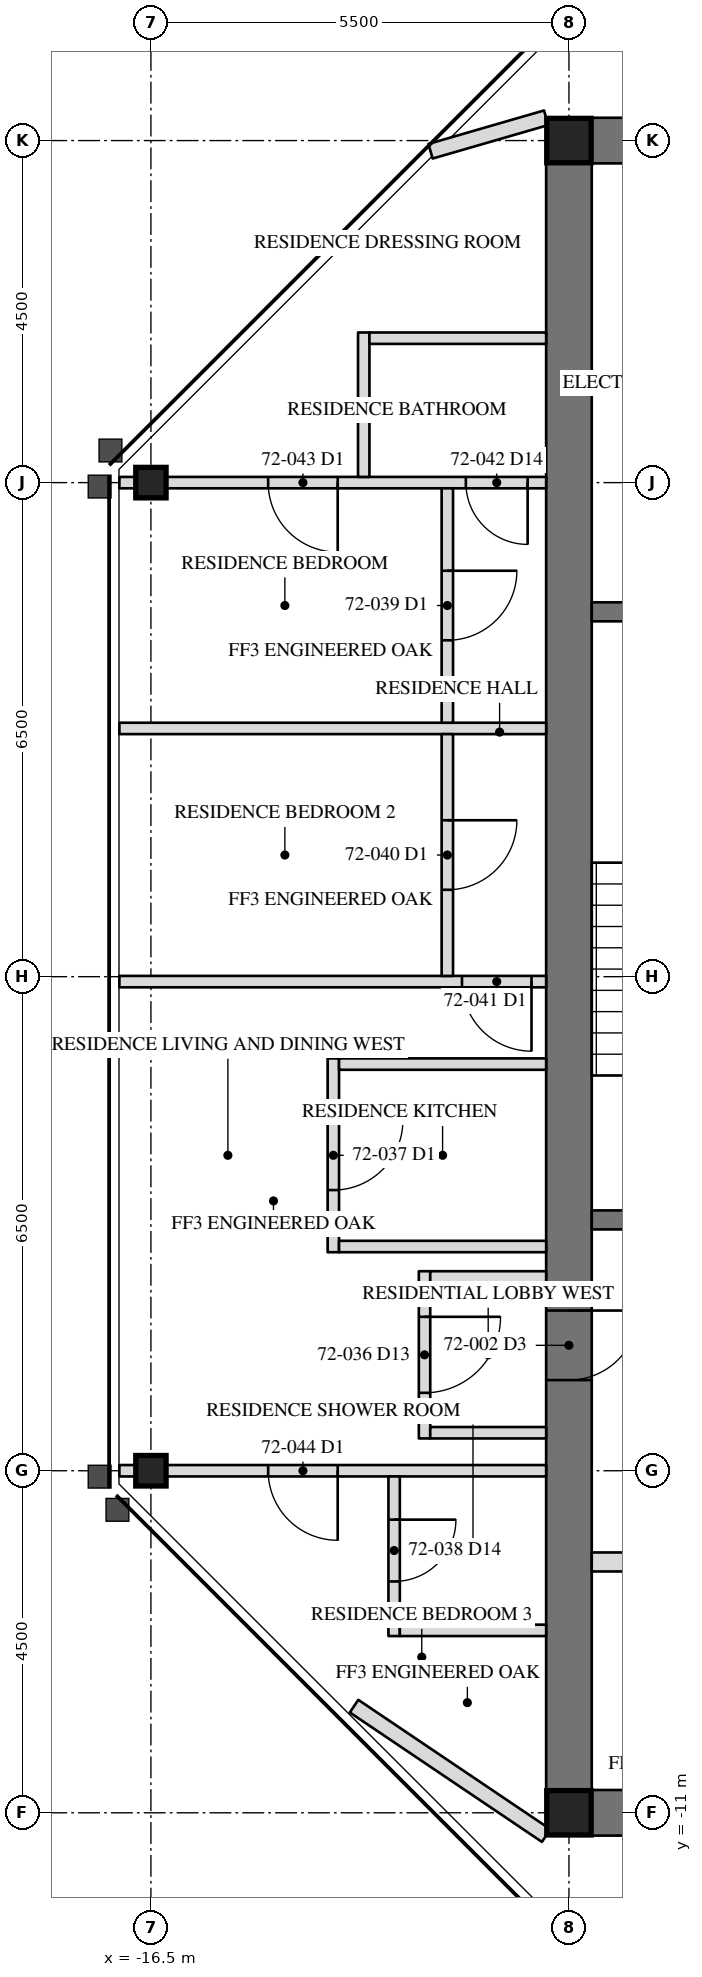
"""IFC4 building model, lengths in metres.
Left out: names, types, materials, properties, quantities, classifications, styles, units other than length and angle.
Written with IfcOpenShell. Run it as: python <this file> out.ifc"""

import sys

from ifc_helpers import new_model, si_unit, direction, frame, frame_2d, origin, origin_2d, place, context, subcontext, project, spatial, rectangle, hollow_rectangle, i_section, extrude, element, fill, save


model = new_model("IFC4")
c1 = context("Model", 3, precision=1e-05, world=origin(), true_north=direction((0.0, 1.0)))
c2 = subcontext(c1, "Body", "Model", "MODEL_VIEW")
j1 = project(units=[si_unit("LENGTHUNIT", "METRE"), si_unit("PLANEANGLEUNIT", "RADIAN")], contexts=[c1])
p1 = place(None, origin())
s1 = spatial("IfcSite", under=j1, at=p1, CompositionType="ELEMENT")
p2 = place(p1, origin())
s2 = spatial("IfcBuilding", under=s1, at=p2, CompositionType="ELEMENT")
p3 = place(p2, frame((0.0, 0.0, 292.0)))
s3 = spatial("IfcBuildingStorey", under=s2, at=p3, CompositionType="ELEMENT", Elevation=292.0)
for number, where, z_axis, x_axis in (
    (1, (-16.5, -6.5, 0.0), (0.0, 0.0, 1.0), (0.0, 1.0, 0.0)),
    (2, (-16.5, 6.5, 0.0), (0.0, 0.0, 1.0), (0.0, 1.0, 0.0)),
):
    element("IfcColumn", number, at=place(p3, frame(where, z_axis=z_axis, x_axis=x_axis)), inside=s3, PredefinedType="COLUMN", context=c2, shape_type="SweptSolid", body=[
        extrude(i_section(OverallWidth=0.401, OverallDepth=0.399, WebThickness=0.025, FlangeThickness=0.04, at=origin_2d()), origin(), (0.0, 0.0, 1.0), 3.6),
    ])
p4 = place(p3, frame((-11.0, 11.0, 0.0), z_axis=(0.0, 0.0, 1.0), x_axis=(0.0, -1.0, 0.0)))
e3 = element("IfcWall", 3, at=p4, inside=s3, PredefinedType="SHEAR", context=c2, shape_type="SweptSolid", body=[
    extrude(rectangle(XDim=22.0, YDim=0.6, at=frame_2d((11.0, 0.0))), origin(), (0.0, 0.0, 1.0), 3.6),
])
p5 = place(p4, frame((15.393, 0.0, 0.0)))
e4 = element("IfcOpeningElement", 4, at=p5, cuts=e3, PredefinedType="OPENING", context=c2, shape_type="SweptSolid", body=[
    extrude(rectangle(XDim=0.915, YDim=2.134, at=frame_2d((0.458, 1.067))), frame((0.0, 0.31, 0.0), z_axis=(0.0, -1.0, 0.0), x_axis=(1.0, 0.0, 0.0)), (0.0, 0.0, 1.0), 0.62),
])
for number, where, z_axis, x_axis in (
    (5, (-6.5, 11.0, 0.0), (0.0, 0.0, 1.0), (-1.0, 0.0, 0.0)),
    (6, (-11.0, -11.0, 0.0), (0.0, 0.0, 1.0), (1.0, 0.0, 0.0)),
):
    element("IfcWall", number, at=place(p3, frame(where, z_axis=z_axis, x_axis=x_axis)), inside=s3, PredefinedType="SHEAR", context=c2, shape_type="SweptSolid", body=[
        extrude(rectangle(XDim=4.5, YDim=0.6, at=frame_2d((2.25, 0.0))), origin(), (0.0, 0.0, 1.0), 3.6),
    ])
for number, where, z_axis, x_axis in (
    (7, (-11.0, 11.0, 0.0), (0.0, 0.0, 1.0), (1.0, 0.0, 0.0)),
    (8, (-11.0, -11.0, 0.0), (0.0, 0.0, 1.0), (1.0, 0.0, 0.0)),
):
    element("IfcColumn", number, at=place(p3, frame(where, z_axis=z_axis, x_axis=x_axis)), inside=s3, PredefinedType="COLUMN", context=c2, shape_type="SweptSolid", body=[
        extrude(hollow_rectangle(XDim=0.584, YDim=0.584, WallThickness=0.051, at=origin_2d()), origin(), (0.0, 0.0, 1.0), 3.6),
    ])
p6 = place(p3, frame((-6.95, 4.8, 0.0), z_axis=(0.0, 0.0, 1.0), x_axis=(-1.0, 0.0, 0.0)))
e9 = element("IfcWall", 9, at=p6, inside=s3, PredefinedType="SOLIDWALL", context=c2, shape_type="SweptSolid", body=[
    extrude(rectangle(XDim=3.75, YDim=0.25, at=frame_2d((1.875, 0.0))), origin(), (0.0, 0.0, 1.0), 3.41),
])
p7 = place(p3, frame((-6.95, -3.2, 0.0), z_axis=(0.0, 0.0, 1.0), x_axis=(-1.0, 0.0, 0.0)))
e10 = element("IfcWall", 10, at=p7, inside=s3, PredefinedType="SOLIDWALL", context=c2, shape_type="SweptSolid", body=[
    extrude(rectangle(XDim=3.75, YDim=0.25, at=frame_2d((1.875, 0.0))), origin(), (0.0, 0.0, 1.0), 3.41),
])
p8 = place(p7, frame((1.342, 0.0, 0.0)))
e11 = element("IfcOpeningElement", 11, at=p8, cuts=e10, PredefinedType="OPENING", context=c2, shape_type="SweptSolid", body=[
    extrude(rectangle(XDim=1.067, YDim=2.134, at=frame_2d((0.533, 1.067))), frame((0.0, 0.135, 0.0), z_axis=(0.0, -1.0, 0.0), x_axis=(1.0, 0.0, 0.0)), (0.0, 0.0, 1.0), 0.27),
])
p9 = place(p3, frame((-6.95, -7.7, 0.0), z_axis=(0.0, 0.0, 1.0), x_axis=(-1.0, 0.0, 0.0)))
e12 = element("IfcWall", 12, at=p9, inside=s3, PredefinedType="PARTITIONING", context=c2, shape_type="SweptSolid", body=[
    extrude(rectangle(XDim=3.75, YDim=0.25, at=frame_2d((1.875, 0.0))), origin(), (0.0, 0.0, 1.0), 3.41),
])
p10 = place(p9, frame((0.45, 0.0, 0.0)))
e13 = element("IfcOpeningElement", 13, at=p10, cuts=e12, PredefinedType="OPENING", context=c2, shape_type="SweptSolid", body=[
    extrude(rectangle(XDim=1.219, YDim=2.134, at=frame_2d((0.609, 1.067))), frame((0.0, 0.135, 0.0), z_axis=(0.0, -1.0, 0.0), x_axis=(1.0, 0.0, 0.0)), (0.0, 0.0, 1.0), 0.27),
])
p11 = place(p3, frame((-11.3, 11.3, 0.0), z_axis=(0.0, 0.0, 1.0), x_axis=(-0.960552344683, -0.278099250491, 0.0)))
e14 = element("IfcWall", 14, at=p11, inside=s3, PredefinedType="PARTITIONING", context=c2, shape_type="SweptSolid", body=[
    extrude(rectangle(XDim=1.584, YDim=0.2, at=frame_2d((0.792, 0.0))), origin(), (0.0, 0.0, 1.0), 3.41),
])
p12 = place(p3, frame((-11.3, -11.3, 0.0), z_axis=(0.0, 0.0, 1.0), x_axis=(-0.829279340477, 0.558834300538, 0.0)))
e15 = element("IfcWall", 15, at=p12, inside=s3, PredefinedType="PARTITIONING", context=c2, shape_type="SweptSolid", body=[
    extrude(rectangle(XDim=3.048, YDim=0.2, at=frame_2d((1.524, 0.0))), origin(), (0.0, 0.0, 1.0), 2.704),
])
p13 = place(p3, frame((-11.3, 6.5, 0.0), z_axis=(0.0, 0.0, 1.0), x_axis=(-1.0, 0.0, 0.0)))
e16 = element("IfcWall", 16, at=p13, inside=s3, PredefinedType="PARTITIONING", context=c2, shape_type="SweptSolid", body=[
    extrude(rectangle(XDim=5.615, YDim=0.15, at=frame_2d((2.808, 0.0))), origin(), (0.0, 0.0, 1.0), 2.966),
])
p14 = place(p13, frame((0.243, 0.0, 0.0)))
e17 = element("IfcOpeningElement", 17, at=p14, cuts=e16, PredefinedType="OPENING", context=c2, shape_type="SweptSolid", body=[
    extrude(rectangle(XDim=0.813, YDim=2.032, at=frame_2d((0.406, 1.016))), frame((0.0, 0.085, 0.0), z_axis=(0.0, -1.0, 0.0), x_axis=(1.0, 0.0, 0.0)), (0.0, 0.0, 1.0), 0.17),
])
p15 = place(p13, frame((2.742, 0.0, 0.0)))
e18 = element("IfcOpeningElement", 18, at=p15, cuts=e16, PredefinedType="OPENING", context=c2, shape_type="SweptSolid", body=[
    extrude(rectangle(XDim=0.915, YDim=2.134, at=frame_2d((0.458, 1.067))), frame((0.0, 0.085, 0.0), z_axis=(0.0, -1.0, 0.0), x_axis=(1.0, 0.0, 0.0)), (0.0, 0.0, 1.0), 0.17),
])
p16 = place(p3, frame((-11.3, 3.266, 0.0), z_axis=(0.0, 0.0, 1.0), x_axis=(-1.0, 0.0, 0.0)))
e19 = element("IfcWall", 19, at=p16, inside=s3, PredefinedType="PARTITIONING", context=c2, shape_type="SweptSolid", body=[
    extrude(rectangle(XDim=5.615, YDim=0.15, at=frame_2d((2.808, 0.0))), origin(), (0.0, 0.0, 1.0), 2.709),
])
p17 = place(p3, frame((-11.3, -0.065, 0.0), z_axis=(0.0, 0.0, 1.0), x_axis=(-1.0, 0.0, 0.0)))
e20 = element("IfcWall", 20, at=p17, inside=s3, PredefinedType="PARTITIONING", context=c2, shape_type="SweptSolid", body=[
    extrude(rectangle(XDim=5.615, YDim=0.15, at=frame_2d((2.808, 0.0))), origin(), (0.0, 0.0, 1.0), 2.709),
])
p18 = place(p17, frame((0.192, 0.0, 0.0)))
e21 = element("IfcOpeningElement", 21, at=p18, cuts=e20, PredefinedType="OPENING", context=c2, shape_type="SweptSolid", body=[
    extrude(rectangle(XDim=0.915, YDim=2.134, at=frame_2d((0.458, 1.067))), frame((0.0, 0.085, 0.0), z_axis=(0.0, -1.0, 0.0), x_axis=(1.0, 0.0, 0.0)), (0.0, 0.0, 1.0), 0.17),
])
p19 = place(p3, frame((-11.3, -6.5, 0.0), z_axis=(0.0, 0.0, 1.0), x_axis=(-1.0, 0.0, 0.0)))
e22 = element("IfcWall", 22, at=p19, inside=s3, PredefinedType="PARTITIONING", context=c2, shape_type="SweptSolid", body=[
    extrude(rectangle(XDim=5.615, YDim=0.15, at=frame_2d((2.808, 0.0))), origin(), (0.0, 0.0, 1.0), 2.966),
])
p20 = place(p19, frame((2.742, 0.0, 0.0)))
e23 = element("IfcOpeningElement", 23, at=p20, cuts=e22, PredefinedType="OPENING", context=c2, shape_type="SweptSolid", body=[
    extrude(rectangle(XDim=0.915, YDim=2.134, at=frame_2d((0.458, 1.067))), frame((0.0, 0.085, 0.0), z_axis=(0.0, -1.0, 0.0), x_axis=(1.0, 0.0, 0.0)), (0.0, 0.0, 1.0), 0.17),
])
p21 = place(p3, frame((-12.9, -3.875, 0.0), z_axis=(0.0, 0.0, 1.0), x_axis=(0.0, -1.0, 0.0)))
e24 = element("IfcWall", 24, at=p21, inside=s3, PredefinedType="PARTITIONING", context=c2, shape_type="SweptSolid", body=[
    extrude(rectangle(XDim=2.2, YDim=0.15, at=frame_2d((1.1, 0.0))), origin(), (0.0, 0.0, 1.0), 3.41),
])
p22 = place(p21, frame((0.6, 0.0, 0.0)))
e25 = element("IfcOpeningElement", 25, at=p22, cuts=e24, PredefinedType="OPENING", context=c2, shape_type="SweptSolid", body=[
    extrude(rectangle(XDim=1.0, YDim=2.134, at=frame_2d((0.5, 1.067))), frame((0.0, 0.085, 0.0), z_axis=(0.0, -1.0, 0.0), x_axis=(1.0, 0.0, 0.0)), (0.0, 0.0, 1.0), 0.17),
])
for number, where, z_axis, x_axis in (
    (26, (-11.3, -3.95, 0.0), (0.0, 0.0, 1.0), (-1.0, 0.0, 0.0)),
    (27, (-11.3, -6.0, 0.0), (0.0, 0.0, 1.0), (-1.0, 0.0, 0.0)),
):
    element("IfcWall", number, at=place(p3, frame(where, z_axis=z_axis, x_axis=x_axis)), inside=s3, PredefinedType="PARTITIONING", context=c2, shape_type="SweptSolid", body=[
        extrude(rectangle(XDim=1.525, YDim=0.15, at=frame_2d((0.762, 0.0))), origin(), (0.0, 0.0, 1.0), 3.41),
    ])
p23 = place(p3, frame((-14.1, -1.075, 0.0), z_axis=(0.0, 0.0, 1.0), x_axis=(0.0, -1.0, 0.0)))
e28 = element("IfcWall", 28, at=p23, inside=s3, PredefinedType="PARTITIONING", context=c2, shape_type="SweptSolid", body=[
    extrude(rectangle(XDim=2.55, YDim=0.15, at=frame_2d((1.275, 0.0))), origin(), (0.0, 0.0, 1.0), 3.41),
])
p24 = place(p23, frame((0.817, 0.0, 0.0)))
e29 = element("IfcOpeningElement", 29, at=p24, cuts=e28, PredefinedType="OPENING", context=c2, shape_type="SweptSolid", body=[
    extrude(rectangle(XDim=0.915, YDim=2.134, at=frame_2d((0.458, 1.067))), frame((0.0, 0.085, 0.0), z_axis=(0.0, -1.0, 0.0), x_axis=(1.0, 0.0, 0.0)), (0.0, 0.0, 1.0), 0.17),
])
for number, where, z_axis, x_axis in (
    (30, (-11.3, -1.15, 0.0), (0.0, 0.0, 1.0), (-1.0, 0.0, 0.0)),
    (31, (-11.3, -3.55, 0.0), (0.0, 0.0, 1.0), (-1.0, 0.0, 0.0)),
):
    element("IfcWall", number, at=place(p3, frame(where, z_axis=z_axis, x_axis=x_axis)), inside=s3, PredefinedType="PARTITIONING", context=c2, shape_type="SweptSolid", body=[
        extrude(rectangle(XDim=2.725, YDim=0.15, at=frame_2d((1.362, 0.0))), origin(), (0.0, 0.0, 1.0), 3.41),
    ])
p25 = place(p3, frame((-13.3, -6.575, 0.0), z_axis=(0.0, 0.0, 1.0), x_axis=(0.0, -1.0, 0.0)))
e32 = element("IfcWall", 32, at=p25, inside=s3, PredefinedType="PARTITIONING", context=c2, shape_type="SweptSolid", body=[
    extrude(rectangle(XDim=2.1, YDim=0.15, at=frame_2d((1.05, 0.0))), origin(), (0.0, 0.0, 1.0), 3.41),
])
p26 = place(p25, frame((0.569, 0.0, 0.0)))
e33 = element("IfcOpeningElement", 33, at=p26, cuts=e32, PredefinedType="OPENING", context=c2, shape_type="SweptSolid", body=[
    extrude(rectangle(XDim=0.813, YDim=2.032, at=frame_2d((0.406, 1.016))), frame((0.0, 0.085, 0.0), z_axis=(0.0, -1.0, 0.0), x_axis=(1.0, 0.0, 0.0)), (0.0, 0.0, 1.0), 0.17),
])
p27 = place(p3, frame((-11.3, -8.6, 0.0), z_axis=(0.0, 0.0, 1.0), x_axis=(-1.0, 0.0, 0.0)))
e34 = element("IfcWall", 34, at=p27, inside=s3, PredefinedType="PARTITIONING", context=c2, shape_type="SweptSolid", body=[
    extrude(rectangle(XDim=1.925, YDim=0.15, at=frame_2d((0.962, 0.0))), origin(), (0.0, 0.0, 1.0), 3.41),
])
p28 = place(p3, frame((-12.6, 6.425, 0.0), z_axis=(0.0, 0.0, 1.0), x_axis=(0.0, -1.0, 0.0)))
e35 = element("IfcWall", 35, at=p28, inside=s3, PredefinedType="PARTITIONING", context=c2, shape_type="SweptSolid", body=[
    extrude(rectangle(XDim=3.084, YDim=0.15, at=frame_2d((1.542, 0.0))), origin(), (0.0, 0.0, 1.0), 3.41),
])
p29 = place(p28, frame((1.084, 0.0, 0.0)))
e36 = element("IfcOpeningElement", 36, at=p29, cuts=e35, PredefinedType="OPENING", context=c2, shape_type="SweptSolid", body=[
    extrude(rectangle(XDim=0.915, YDim=2.134, at=frame_2d((0.458, 1.067))), frame((0.0, 0.085, 0.0), z_axis=(0.0, -1.0, 0.0), x_axis=(1.0, 0.0, 0.0)), (0.0, 0.0, 1.0), 0.17),
])
p30 = place(p3, frame((-12.6, 3.191, 0.0), z_axis=(0.0, 0.0, 1.0), x_axis=(0.0, -1.0, 0.0)))
e37 = element("IfcWall", 37, at=p30, inside=s3, PredefinedType="PARTITIONING", context=c2, shape_type="SweptSolid", body=[
    extrude(rectangle(XDim=3.181, YDim=0.15, at=frame_2d((1.59, 0.0))), origin(), (0.0, 0.0, 1.0), 3.41),
])
p31 = place(p30, frame((1.133, 0.0, 0.0)))
e38 = element("IfcOpeningElement", 38, at=p31, cuts=e37, PredefinedType="OPENING", context=c2, shape_type="SweptSolid", body=[
    extrude(rectangle(XDim=0.915, YDim=2.134, at=frame_2d((0.458, 1.067))), frame((0.0, 0.085, 0.0), z_axis=(0.0, -1.0, 0.0), x_axis=(1.0, 0.0, 0.0)), (0.0, 0.0, 1.0), 0.17),
])
p32 = place(p3, frame((-13.7, 6.575, 0.0), z_axis=(0.0, 0.0, 1.0), x_axis=(0.0, 1.0, 0.0)))
e39 = element("IfcWall", 39, at=p32, inside=s3, PredefinedType="PARTITIONING", context=c2, shape_type="SweptSolid", body=[
    extrude(rectangle(XDim=1.9, YDim=0.15, at=frame_2d((0.95, 0.0))), origin(), (0.0, 0.0, 1.0), 3.41),
])
p33 = place(p3, frame((-11.3, 8.4, 0.0), z_axis=(0.0, 0.0, 1.0), x_axis=(-1.0, 0.0, 0.0)))
e40 = element("IfcWall", 40, at=p33, inside=s3, PredefinedType="PARTITIONING", context=c2, shape_type="SweptSolid", body=[
    extrude(rectangle(XDim=2.325, YDim=0.15, at=frame_2d((1.163, 0.0))), origin(), (0.0, 0.0, 1.0), 3.41),
])
p34 = place(p5, origin())
e41 = element("IfcDoor", 41, at=p34, inside=s3, OperationType="SINGLE_SWING_RIGHT", PredefinedType="DOOR", context=c2, shape_type="SweptSolid", body=[
    extrude(rectangle(XDim=0.915, YDim=2.134, at=frame_2d((0.458, 1.067))), frame((0.0, -0.225, 0.0), z_axis=(0.0, -1.0, 0.0), x_axis=(1.0, 0.0, 0.0)), (0.0, 0.0, 1.0), 0.05),
])
fill(e4, e41)
p35 = place(p22, origin())
e42 = element("IfcDoor", 42, at=p35, inside=s3, OperationType="SINGLE_SWING_RIGHT", PredefinedType="DOOR", context=c2, shape_type="SweptSolid", body=[
    extrude(rectangle(XDim=1.0, YDim=2.134, at=frame_2d((0.5, 1.067))), frame((0.0, 0.025, 0.0), z_axis=(0.0, -1.0, 0.0), x_axis=(1.0, 0.0, 0.0)), (0.0, 0.0, 1.0), 0.05),
])
fill(e25, e42)
p36 = place(p24, origin())
e43 = element("IfcDoor", 43, at=p36, inside=s3, OperationType="SINGLE_SWING_LEFT", PredefinedType="DOOR", context=c2, shape_type="SweptSolid", body=[
    extrude(rectangle(XDim=0.915, YDim=2.134, at=frame_2d((0.458, 1.067))), frame((0.0, 0.025, 0.0), z_axis=(0.0, -1.0, 0.0), x_axis=(1.0, 0.0, 0.0)), (0.0, 0.0, 1.0), 0.05),
])
fill(e29, e43)
p37 = place(p26, origin())
e44 = element("IfcDoor", 44, at=p37, inside=s3, OperationType="SINGLE_SWING_LEFT", PredefinedType="DOOR", context=c2, shape_type="SweptSolid", body=[
    extrude(rectangle(XDim=0.813, YDim=2.032, at=frame_2d((0.406, 1.016))), frame((0.0, 0.025, 0.0), z_axis=(0.0, -1.0, 0.0), x_axis=(1.0, 0.0, 0.0)), (0.0, 0.0, 1.0), 0.05),
])
fill(e33, e44)
p38 = place(p29, origin())
e45 = element("IfcDoor", 45, at=p38, inside=s3, OperationType="SINGLE_SWING_LEFT", PredefinedType="DOOR", context=c2, shape_type="SweptSolid", body=[
    extrude(rectangle(XDim=0.915, YDim=2.134, at=frame_2d((0.458, 1.067))), frame((0.0, 0.025, 0.0), z_axis=(0.0, -1.0, 0.0), x_axis=(1.0, 0.0, 0.0)), (0.0, 0.0, 1.0), 0.05),
])
fill(e36, e45)
p39 = place(p31, origin())
e46 = element("IfcDoor", 46, at=p39, inside=s3, OperationType="SINGLE_SWING_LEFT", PredefinedType="DOOR", context=c2, shape_type="SweptSolid", body=[
    extrude(rectangle(XDim=0.915, YDim=2.134, at=frame_2d((0.458, 1.067))), frame((0.0, 0.025, 0.0), z_axis=(0.0, -1.0, 0.0), x_axis=(1.0, 0.0, 0.0)), (0.0, 0.0, 1.0), 0.05),
])
fill(e38, e46)
p40 = place(p18, origin())
e47 = element("IfcDoor", 47, at=p40, inside=s3, OperationType="SINGLE_SWING_LEFT", PredefinedType="DOOR", context=c2, shape_type="SweptSolid", body=[
    extrude(rectangle(XDim=0.915, YDim=2.134, at=frame_2d((0.458, 1.067))), frame((0.0, 0.025, 0.0), z_axis=(0.0, -1.0, 0.0), x_axis=(1.0, 0.0, 0.0)), (0.0, 0.0, 1.0), 0.05),
])
fill(e21, e47)
p41 = place(p14, origin())
e48 = element("IfcDoor", 48, at=p41, inside=s3, OperationType="SINGLE_SWING_LEFT", PredefinedType="DOOR", context=c2, shape_type="SweptSolid", body=[
    extrude(rectangle(XDim=0.813, YDim=2.032, at=frame_2d((0.406, 1.016))), frame((0.0, 0.025, 0.0), z_axis=(0.0, -1.0, 0.0), x_axis=(1.0, 0.0, 0.0)), (0.0, 0.0, 1.0), 0.05),
])
fill(e17, e48)
p42 = place(p15, origin())
e49 = element("IfcDoor", 49, at=p42, inside=s3, OperationType="SINGLE_SWING_LEFT", PredefinedType="DOOR", context=c2, shape_type="SweptSolid", body=[
    extrude(rectangle(XDim=0.915, YDim=2.134, at=frame_2d((0.458, 1.067))), frame((0.0, 0.025, 0.0), z_axis=(0.0, -1.0, 0.0), x_axis=(1.0, 0.0, 0.0)), (0.0, 0.0, 1.0), 0.05),
])
fill(e18, e49)
p43 = place(p20, origin())
e50 = element("IfcDoor", 50, at=p43, inside=s3, OperationType="SINGLE_SWING_LEFT", PredefinedType="DOOR", context=c2, shape_type="SweptSolid", body=[
    extrude(rectangle(XDim=0.915, YDim=2.134, at=frame_2d((0.458, 1.067))), frame((0.0, 0.025, 0.0), z_axis=(0.0, -1.0, 0.0), x_axis=(1.0, 0.0, 0.0)), (0.0, 0.0, 1.0), 0.05),
])
fill(e23, e50)
save(model, sys.argv[1])
